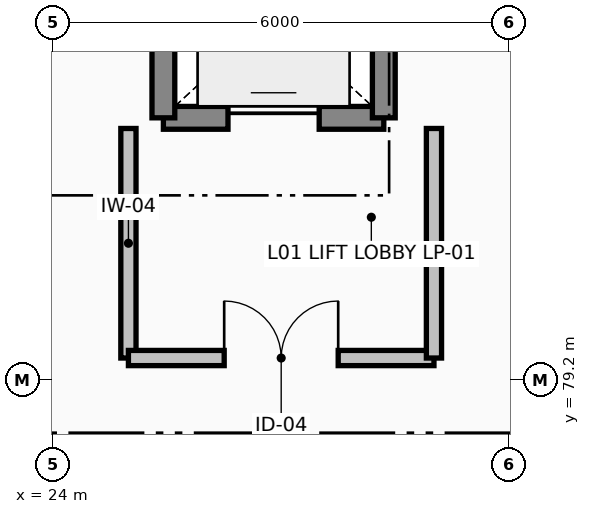
"""IFC4 building model, lengths in metres.
Left out: names, types, materials, properties, quantities, classifications, styles, units other than length and angle.
Written with IfcOpenShell. Run it as: python <this file> out.ifc"""

import sys

from ifc_helpers import new_model, si_unit, direction, frame, frame_2d, origin, place, context, subcontext, project, spatial, rectangle, extrude, element, fill, save


model = new_model("IFC4")
c1 = context("Model", 3, precision=1e-05, world=origin(), true_north=direction((0.0, 1.0)))
c2 = subcontext(c1, "Body", "Model", "MODEL_VIEW")
j1 = project(units=[si_unit("LENGTHUNIT", "METRE"), si_unit("PLANEANGLEUNIT", "RADIAN")], contexts=[c1])
p1 = place(None, origin())
s1 = spatial("IfcSite", under=j1, at=p1, CompositionType="ELEMENT")
p2 = place(p1, origin())
s2 = spatial("IfcBuilding", under=s1, at=p2, CompositionType="ELEMENT")
p3 = place(p2, frame((0.0, 0.0, 5.76)))
s3 = spatial("IfcBuildingStorey", under=s2, at=p3, CompositionType="ELEMENT", Elevation=5.76)
p4 = place(p3, frame((25.45, 82.65, 0.0), z_axis=(0.0, 0.0, 1.0), x_axis=(1.0, 0.0, 0.0)))
e1 = element("IfcWall", 1, at=p4, inside=s3, PredefinedType="SHEAR", context=c2, shape_type="SweptSolid", body=[
    extrude(rectangle(XDim=2.9, YDim=0.3, at=frame_2d((1.45, 0.0))), origin(), (0.0, 0.0, 1.0), 3.78),
])
p5 = place(p4, frame((0.85, 0.0, 0.0)))
e2 = element("IfcOpeningElement", 2, at=p5, cuts=e1, PredefinedType="OPENING", context=c2, shape_type="SweptSolid", body=[
    extrude(rectangle(XDim=1.2, YDim=2.15, at=frame_2d((0.6, 1.075))), frame((0.0, 0.16, 0.0), z_axis=(0.0, -1.0, 0.0), x_axis=(1.0, 0.0, 0.0)), (0.0, 0.0, 1.0), 0.32),
])
for number, where, z_axis, x_axis in (
    (3, (25.45, 82.65, 0.0), (0.0, 0.0, 1.0), (0.0, 1.0, 0.0)),
    (4, (28.35, 82.65, 0.0), (0.0, 0.0, 1.0), (0.0, 1.0, 0.0)),
):
    element("IfcWall", number, at=place(p3, frame(where, z_axis=z_axis, x_axis=x_axis)), inside=s3, PredefinedType="SHEAR", context=c2, shape_type="SweptSolid", body=[
        extrude(rectangle(XDim=2.7, YDim=0.3, at=frame_2d((1.35, 0.0))), origin(), (0.0, 0.0, 1.0), 3.78),
    ])
p6 = place(p3, frame((24.99, 82.51, 0.0), z_axis=(0.0, 0.0, 1.0), x_axis=(0.0, -1.0, 0.0)))
e5 = element("IfcWall", 5, at=p6, inside=s3, PredefinedType="PARTITIONING", context=c2, shape_type="SweptSolid", body=[
    extrude(rectangle(XDim=3.02, YDim=0.2, at=frame_2d((1.51, 0.0))), origin(), (0.0, 0.0, 1.0), 3.82),
])
p7 = place(p3, frame((24.99, 79.49, 0.0), z_axis=(0.0, 0.0, 1.0), x_axis=(1.0, 0.0, 0.0)))
e6 = element("IfcWall", 6, at=p7, inside=s3, PredefinedType="PARTITIONING", context=c2, shape_type="SweptSolid", body=[
    extrude(rectangle(XDim=4.02, YDim=0.2, at=frame_2d((2.01, 0.0))), origin(), (0.0, 0.0, 1.0), 3.82),
])
p8 = place(p7, frame((1.26, 0.0, 0.0)))
e7 = element("IfcOpeningElement", 7, at=p8, cuts=e6, PredefinedType="OPENING", context=c2, shape_type="SweptSolid", body=[
    extrude(rectangle(XDim=1.5, YDim=2.2, at=frame_2d((0.75, 1.1))), frame((0.0, 0.11, 0.0), z_axis=(0.0, -1.0, 0.0), x_axis=(1.0, 0.0, 0.0)), (0.0, 0.0, 1.0), 0.22),
])
p9 = place(p3, frame((29.01, 79.49, 0.0), z_axis=(0.0, 0.0, 1.0), x_axis=(0.0, 1.0, 0.0)))
e8 = element("IfcWall", 8, at=p9, inside=s3, PredefinedType="PARTITIONING", context=c2, shape_type="SweptSolid", body=[
    extrude(rectangle(XDim=3.02, YDim=0.2, at=frame_2d((1.51, 0.0))), origin(), (0.0, 0.0, 1.0), 3.82),
])
p10 = place(p5, origin())
e9 = element("IfcDoor", 9, at=p10, inside=s3, OperationType="SLIDING_TO_LEFT", PredefinedType="DOOR", context=c2, shape_type="SweptSolid", body=[
    extrude(rectangle(XDim=1.2, YDim=2.15, at=frame_2d((0.6, 1.075))), frame((0.0, 0.025, 0.0), z_axis=(0.0, -1.0, 0.0), x_axis=(1.0, 0.0, 0.0)), (0.0, 0.0, 1.0), 0.05),
])
fill(e2, e9)
p11 = place(p8, origin())
e10 = element("IfcDoor", 10, at=p11, inside=s3, OperationType="DOUBLE_SWING_LEFT", PredefinedType="DOOR", context=c2, shape_type="SweptSolid", body=[
    extrude(rectangle(XDim=1.5, YDim=2.2, at=frame_2d((0.75, 1.1))), frame((0.0, 0.025, 0.0), z_axis=(0.0, -1.0, 0.0), x_axis=(1.0, 0.0, 0.0)), (0.0, 0.0, 1.0), 0.05),
])
fill(e7, e10)
save(model, sys.argv[1])
